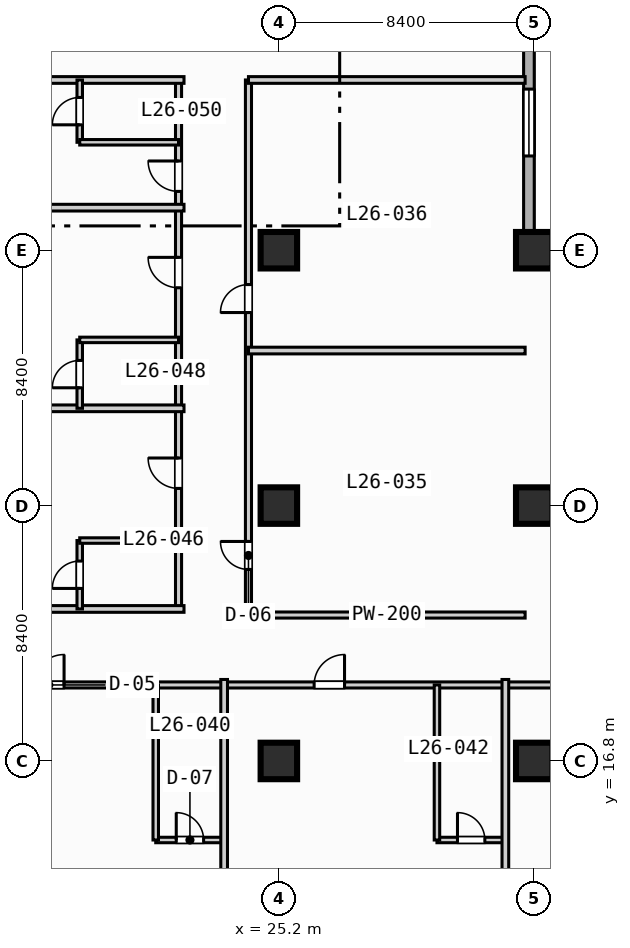
"""IFC4 building model, lengths in metres.
Left out: names, types, materials, properties, quantities, classifications, styles, units other than length and angle.
Written with IfcOpenShell. Run it as: python <this file> out.ifc"""

import sys

from ifc_helpers import new_model, si_unit, direction, frame, frame_2d, origin, origin_2d, place, context, subcontext, project, spatial, rectangle, extrude, element, fill, save


model = new_model("IFC4")
c1 = context("Model", 3, precision=1e-05, world=origin(), true_north=direction((0.0, 1.0)))
c2 = subcontext(c1, "Body", "Model", "MODEL_VIEW")
j1 = project(units=[si_unit("LENGTHUNIT", "METRE"), si_unit("PLANEANGLEUNIT", "RADIAN")], contexts=[c1])
p1 = place(None, origin())
s1 = spatial("IfcSite", under=j1, at=p1, CompositionType="ELEMENT")
p2 = place(p1, origin())
s2 = spatial("IfcBuilding", under=s1, at=p2, CompositionType="ELEMENT")
p3 = place(p2, frame((0.0, 0.0, 111.4)))
s3 = spatial("IfcBuildingStorey", under=s2, at=p3, CompositionType="ELEMENT", Elevation=111.4)
for number, where, z_axis, x_axis in (
    (1, (25.2, 16.8, 0.0), (0.0, 0.0, 1.0), (1.0, 0.0, 0.0)),
    (2, (25.2, 25.2, 0.0), (0.0, 0.0, 1.0), (1.0, 0.0, 0.0)),
    (3, (25.2, 33.6, 0.0), (0.0, 0.0, 1.0), (1.0, 0.0, 0.0)),
    (4, (33.6, 16.8, 0.0), (0.0, 0.0, 1.0), (1.0, 0.0, 0.0)),
    (5, (33.6, 25.2, 0.0), (0.0, 0.0, 1.0), (1.0, 0.0, 0.0)),
    (6, (33.6, 33.6, 0.0), (0.0, 0.0, 1.0), (1.0, 0.0, 0.0)),
):
    element("IfcColumn", number, at=place(p3, frame(where, z_axis=z_axis, x_axis=x_axis)), inside=s3, PredefinedType="COLUMN", context=c2, shape_type="SweptSolid", body=[
        extrude(rectangle(XDim=1.2, YDim=1.2, at=origin_2d()), origin(), (0.0, 0.0, 1.0), 3.8),
    ])
p4 = place(p3, frame((33.425, 89.225, 0.0), z_axis=(0.0, 0.0, 1.0), x_axis=(0.0, -1.0, 0.0)))
e7 = element("IfcWall", 7, at=p4, inside=s3, PredefinedType="STANDARD", context=c2, shape_type="SweptSolid", body=[
    extrude(rectangle(XDim=55.8, YDim=0.35, at=frame_2d((27.9, 0.0))), origin(), (0.0, 0.0, 1.0), 3.55),
])
p5 = place(p4, frame((50.325, 0.0, 0.85)))
e8 = element("IfcOpeningElement", 8, at=p5, cuts=e7, PredefinedType="OPENING", context=c2, shape_type="SweptSolid", body=[
    extrude(rectangle(XDim=2.2, YDim=1.8, at=frame_2d((1.1, 0.9))), frame((0.0, 0.185, 0.0), z_axis=(0.0, -1.0, 0.0), x_axis=(1.0, 0.0, 0.0)), (0.0, 0.0, 1.0), 0.37),
])
p6 = place(p4, frame((33.525, 0.0, 0.85)))
e9 = element("IfcOpeningElement", 9, at=p6, cuts=e7, PredefinedType="OPENING", context=c2, shape_type="SweptSolid", body=[
    extrude(rectangle(XDim=2.2, YDim=1.8, at=frame_2d((1.1, 0.9))), frame((0.0, 0.185, 0.0), z_axis=(0.0, -1.0, 0.0), x_axis=(1.0, 0.0, 0.0)), (0.0, 0.0, 1.0), 0.37),
])
p7 = place(p4, frame((25.125, 0.0, 0.85)))
e10 = element("IfcOpeningElement", 10, at=p7, cuts=e7, PredefinedType="OPENING", context=c2, shape_type="SweptSolid", body=[
    extrude(rectangle(XDim=2.2, YDim=1.8, at=frame_2d((1.1, 0.9))), frame((0.0, 0.185, 0.0), z_axis=(0.0, -1.0, 0.0), x_axis=(1.0, 0.0, 0.0)), (0.0, 0.0, 1.0), 0.37),
])
p8 = place(p4, frame((16.725, 0.0, 0.85)))
e11 = element("IfcOpeningElement", 11, at=p8, cuts=e7, PredefinedType="OPENING", context=c2, shape_type="SweptSolid", body=[
    extrude(rectangle(XDim=2.2, YDim=1.8, at=frame_2d((1.1, 0.9))), frame((0.0, 0.185, 0.0), z_axis=(0.0, -1.0, 0.0), x_axis=(1.0, 0.0, 0.0)), (0.0, 0.0, 1.0), 0.37),
])
p9 = place(p4, frame((8.325, 0.0, 0.85)))
e12 = element("IfcOpeningElement", 12, at=p9, cuts=e7, PredefinedType="OPENING", context=c2, shape_type="SweptSolid", body=[
    extrude(rectangle(XDim=2.2, YDim=1.8, at=frame_2d((1.1, 0.9))), frame((0.0, 0.185, 0.0), z_axis=(0.0, -1.0, 0.0), x_axis=(1.0, 0.0, 0.0)), (0.0, 0.0, 1.0), 0.37),
])
p10 = place(p3, frame((33.425, 33.425, 0.0), z_axis=(0.0, 0.0, 1.0), x_axis=(1.0, 0.0, 0.0)))
e13 = element("IfcWall", 13, at=p10, inside=s3, PredefinedType="STANDARD", context=c2, shape_type="SweptSolid", body=[
    extrude(rectangle(XDim=39.0, YDim=0.35, at=frame_2d((19.5, 0.0))), origin(), (0.0, 0.0, 1.0), 3.55),
])
p11 = place(p10, frame((12.075, 0.0, 0.0)))
e14 = element("IfcOpeningElement", 14, at=p11, cuts=e13, PredefinedType="OPENING", context=c2, shape_type="SweptSolid", body=[
    extrude(rectangle(XDim=1.4, YDim=2.2, at=frame_2d((0.7, 1.1))), frame((0.0, 0.185, 0.0), z_axis=(0.0, -1.0, 0.0), x_axis=(1.0, 0.0, 0.0)), (0.0, 0.0, 1.0), 0.37),
])
p12 = place(p10, frame((20.075, 0.0, 0.85)))
e15 = element("IfcOpeningElement", 15, at=p12, cuts=e13, PredefinedType="OPENING", context=c2, shape_type="SweptSolid", body=[
    extrude(rectangle(XDim=2.2, YDim=1.8, at=frame_2d((1.1, 0.9))), frame((0.0, 0.185, 0.0), z_axis=(0.0, -1.0, 0.0), x_axis=(1.0, 0.0, 0.0)), (0.0, 0.0, 1.0), 0.37),
])
p13 = place(p10, frame((28.475, 0.0, 0.85)))
e16 = element("IfcOpeningElement", 16, at=p13, cuts=e13, PredefinedType="OPENING", context=c2, shape_type="SweptSolid", body=[
    extrude(rectangle(XDim=2.2, YDim=1.8, at=frame_2d((1.1, 0.9))), frame((0.0, 0.185, 0.0), z_axis=(0.0, -1.0, 0.0), x_axis=(1.0, 0.0, 0.0)), (0.0, 0.0, 1.0), 0.37),
])
p14 = place(p3, frame((24.2, 21.6, 0.0), z_axis=(0.0, 0.0, 1.0), x_axis=(0.0, 1.0, 0.0)))
e17 = element("IfcWall", 17, at=p14, inside=s3, PredefinedType="PARTITIONING", context=c2, shape_type="SweptSolid", body=[
    extrude(rectangle(XDim=17.6, YDim=0.2, at=frame_2d((8.8, 0.0))), origin(), (0.0, 0.0, 1.0), 3.55),
])
p15 = place(p14, frame((1.5, 0.0, 0.0)))
e18 = element("IfcOpeningElement", 18, at=p15, cuts=e17, PredefinedType="OPENING", context=c2, shape_type="SweptSolid", body=[
    extrude(rectangle(XDim=0.92, YDim=2.1, at=frame_2d((0.46, 1.05))), frame((0.0, 0.11, 0.0), z_axis=(0.0, -1.0, 0.0), x_axis=(1.0, 0.0, 0.0)), (0.0, 0.0, 1.0), 0.22),
])
p16 = place(p14, frame((9.95, 0.0, 0.0)))
e19 = element("IfcOpeningElement", 19, at=p16, cuts=e17, PredefinedType="OPENING", context=c2, shape_type="SweptSolid", body=[
    extrude(rectangle(XDim=0.92, YDim=2.1, at=frame_2d((0.46, 1.05))), frame((0.0, 0.11, 0.0), z_axis=(0.0, -1.0, 0.0), x_axis=(1.0, 0.0, 0.0)), (0.0, 0.0, 1.0), 0.22),
])
p17 = place(p3, frame((24.2, 21.6, 0.0), z_axis=(0.0, 0.0, 1.0), x_axis=(1.0, 0.0, 0.0)))
e20 = element("IfcWall", 20, at=p17, inside=s3, PredefinedType="PARTITIONING", context=c2, shape_type="SweptSolid", body=[
    extrude(rectangle(XDim=9.1, YDim=0.2, at=frame_2d((4.55, 0.0))), origin(), (0.0, 0.0, 1.0), 3.55),
])
for number, where, z_axis, x_axis in (
    (21, (24.2, 30.3, 0.0), (0.0, 0.0, 1.0), (1.0, 0.0, 0.0)),
    (22, (24.2, 39.2, 0.0), (0.0, 0.0, 1.0), (1.0, 0.0, 0.0)),
):
    element("IfcWall", number, at=place(p3, frame(where, z_axis=z_axis, x_axis=x_axis)), inside=s3, PredefinedType="PARTITIONING", context=c2, shape_type="SweptSolid", body=[
        extrude(rectangle(XDim=9.1, YDim=0.22, at=frame_2d((4.55, 0.0))), origin(), (0.0, 0.0, 1.0), 3.55),
    ])
p18 = place(p3, frame((3.4, 19.3, 0.0), z_axis=(0.0, 0.0, 1.0), x_axis=(1.0, 0.0, 0.0)))
e23 = element("IfcWall", 23, at=p18, inside=s3, PredefinedType="PARTITIONING", context=c2, shape_type="SweptSolid", body=[
    extrude(rectangle(XDim=35.8, YDim=0.2, at=frame_2d((17.9, 0.0))), origin(), (0.0, 0.0, 1.0), 3.55),
])
p19 = place(p18, frame((6.065, 0.0, 0.0)))
e24 = element("IfcOpeningElement", 24, at=p19, cuts=e23, PredefinedType="OPENING", context=c2, shape_type="SweptSolid", body=[
    extrude(rectangle(XDim=1.0, YDim=2.15, at=frame_2d((0.5, 1.075))), frame((0.0, 0.11, 0.0), z_axis=(0.0, -1.0, 0.0), x_axis=(1.0, 0.0, 0.0)), (0.0, 0.0, 1.0), 0.22),
])
p20 = place(p18, frame((13.735, 0.0, 0.0)))
e25 = element("IfcOpeningElement", 25, at=p20, cuts=e23, PredefinedType="OPENING", context=c2, shape_type="SweptSolid", body=[
    extrude(rectangle(XDim=1.0, YDim=2.15, at=frame_2d((0.5, 1.075))), frame((0.0, 0.11, 0.0), z_axis=(0.0, -1.0, 0.0), x_axis=(1.0, 0.0, 0.0)), (0.0, 0.0, 1.0), 0.22),
])
p21 = place(p18, frame((22.96, 0.0, 0.0)))
e26 = element("IfcOpeningElement", 26, at=p21, cuts=e23, PredefinedType="OPENING", context=c2, shape_type="SweptSolid", body=[
    extrude(rectangle(XDim=1.0, YDim=2.15, at=frame_2d((0.5, 1.075))), frame((0.0, 0.11, 0.0), z_axis=(0.0, -1.0, 0.0), x_axis=(1.0, 0.0, 0.0)), (0.0, 0.0, 1.0), 0.22),
])
p22 = place(p18, frame((30.86, 0.0, 0.0)))
e27 = element("IfcOpeningElement", 27, at=p22, cuts=e23, PredefinedType="OPENING", context=c2, shape_type="SweptSolid", body=[
    extrude(rectangle(XDim=1.0, YDim=2.15, at=frame_2d((0.5, 1.075))), frame((0.0, 0.11, 0.0), z_axis=(0.0, -1.0, 0.0), x_axis=(1.0, 0.0, 0.0)), (0.0, 0.0, 1.0), 0.22),
])
p23 = place(p3, frame((21.15, 14.2, 0.0), z_axis=(0.0, 0.0, 1.0), x_axis=(1.0, 0.0, 0.0)))
e28 = element("IfcWall", 28, at=p23, inside=s3, PredefinedType="PLUMBINGWALL", context=c2, shape_type="SweptSolid", body=[
    extrude(rectangle(XDim=2.25, YDim=0.18, at=frame_2d((1.125, 0.0))), origin(), (0.0, 0.0, 1.0), 3.55),
])
p24 = place(p23, frame((0.675, 0.0, 0.0)))
e29 = element("IfcOpeningElement", 29, at=p24, cuts=e28, PredefinedType="OPENING", context=c2, shape_type="SweptSolid", body=[
    extrude(rectangle(XDim=0.9, YDim=2.1, at=frame_2d((0.45, 1.05))), frame((0.0, 0.1, 0.0), z_axis=(0.0, -1.0, 0.0), x_axis=(1.0, 0.0, 0.0)), (0.0, 0.0, 1.0), 0.2),
])
p25 = place(p3, frame((21.15, 14.2, 0.0), z_axis=(0.0, 0.0, 1.0), x_axis=(0.0, 1.0, 0.0)))
e30 = element("IfcWall", 30, at=p25, inside=s3, PredefinedType="PLUMBINGWALL", context=c2, shape_type="SweptSolid", body=[
    extrude(rectangle(XDim=5.1, YDim=0.18, at=frame_2d((2.55, 0.0))), origin(), (0.0, 0.0, 1.0), 3.55),
])
p26 = place(p3, frame((23.4, 0.2, 0.0), z_axis=(0.0, 0.0, 1.0), x_axis=(0.0, 1.0, 0.0)))
e31 = element("IfcWall", 31, at=p26, inside=s3, PredefinedType="PARTITIONING", context=c2, shape_type="SweptSolid", body=[
    extrude(rectangle(XDim=19.28, YDim=0.22, at=frame_2d((9.64, 0.0))), origin(), (0.0, 0.0, 1.0), 3.55),
])
p27 = place(p3, frame((30.4, 14.2, 0.0), z_axis=(0.0, 0.0, 1.0), x_axis=(1.0, 0.0, 0.0)))
e32 = element("IfcWall", 32, at=p27, inside=s3, PredefinedType="PLUMBINGWALL", context=c2, shape_type="SweptSolid", body=[
    extrude(rectangle(XDim=2.25, YDim=0.18, at=frame_2d((1.125, 0.0))), origin(), (0.0, 0.0, 1.0), 3.55),
])
p28 = place(p27, frame((0.675, 0.0, 0.0)))
e33 = element("IfcOpeningElement", 33, at=p28, cuts=e32, PredefinedType="OPENING", context=c2, shape_type="SweptSolid", body=[
    extrude(rectangle(XDim=0.9, YDim=2.1, at=frame_2d((0.45, 1.05))), frame((0.0, 0.1, 0.0), z_axis=(0.0, -1.0, 0.0), x_axis=(1.0, 0.0, 0.0)), (0.0, 0.0, 1.0), 0.2),
])
p29 = place(p3, frame((30.4, 14.2, 0.0), z_axis=(0.0, 0.0, 1.0), x_axis=(0.0, 1.0, 0.0)))
e34 = element("IfcWall", 34, at=p29, inside=s3, PredefinedType="PLUMBINGWALL", context=c2, shape_type="SweptSolid", body=[
    extrude(rectangle(XDim=5.1, YDim=0.18, at=frame_2d((2.55, 0.0))), origin(), (0.0, 0.0, 1.0), 3.55),
])
p30 = place(p3, frame((32.65, 0.2, 0.0), z_axis=(0.0, 0.0, 1.0), x_axis=(0.0, 1.0, 0.0)))
e35 = element("IfcWall", 35, at=p30, inside=s3, PredefinedType="PARTITIONING", context=c2, shape_type="SweptSolid", body=[
    extrude(rectangle(XDim=19.28, YDim=0.22, at=frame_2d((9.64, 0.0))), origin(), (0.0, 0.0, 1.0), 3.55),
])
p31 = place(p3, frame((21.9, 21.8, 0.0), z_axis=(0.0, 0.0, 1.0), x_axis=(0.0, 1.0, 0.0)))
e36 = element("IfcWall", 36, at=p31, inside=s3, PredefinedType="PARTITIONING", context=c2, shape_type="SweptSolid", body=[
    extrude(rectangle(XDim=17.4, YDim=0.2, at=frame_2d((8.7, 0.0))), origin(), (0.0, 0.0, 1.0), 3.55),
])
p32 = place(p31, frame((3.965, 0.0, 0.0)))
e37 = element("IfcOpeningElement", 37, at=p32, cuts=e36, PredefinedType="OPENING", context=c2, shape_type="SweptSolid", body=[
    extrude(rectangle(XDim=1.0, YDim=2.15, at=frame_2d((0.5, 1.075))), frame((0.0, 0.11, 0.0), z_axis=(0.0, -1.0, 0.0), x_axis=(1.0, 0.0, 0.0)), (0.0, 0.0, 1.0), 0.22),
])
p33 = place(p31, frame((10.565, 0.0, 0.0)))
e38 = element("IfcOpeningElement", 38, at=p33, cuts=e36, PredefinedType="OPENING", context=c2, shape_type="SweptSolid", body=[
    extrude(rectangle(XDim=1.0, YDim=2.15, at=frame_2d((0.5, 1.075))), frame((0.0, 0.11, 0.0), z_axis=(0.0, -1.0, 0.0), x_axis=(1.0, 0.0, 0.0)), (0.0, 0.0, 1.0), 0.22),
])
p34 = place(p31, frame((13.735, 0.0, 0.0)))
e39 = element("IfcOpeningElement", 39, at=p34, cuts=e36, PredefinedType="OPENING", context=c2, shape_type="SweptSolid", body=[
    extrude(rectangle(XDim=1.0, YDim=2.15, at=frame_2d((0.5, 1.075))), frame((0.0, 0.11, 0.0), z_axis=(0.0, -1.0, 0.0), x_axis=(1.0, 0.0, 0.0)), (0.0, 0.0, 1.0), 0.22),
])
p35 = place(p3, frame((0.2, 21.8, 0.0), z_axis=(0.0, 0.0, 1.0), x_axis=(1.0, 0.0, 0.0)))
e40 = element("IfcWall", 40, at=p35, inside=s3, PredefinedType="PARTITIONING", context=c2, shape_type="SweptSolid", body=[
    extrude(rectangle(XDim=21.88, YDim=0.22, at=frame_2d((10.94, 0.0))), origin(), (0.0, 0.0, 1.0), 3.55),
])
p36 = place(p3, frame((18.65, 21.8, 0.0), z_axis=(0.0, 0.0, 1.0), x_axis=(0.0, 1.0, 0.0)))
e41 = element("IfcWall", 41, at=p36, inside=s3, PredefinedType="PLUMBINGWALL", context=c2, shape_type="SweptSolid", body=[
    extrude(rectangle(XDim=2.25, YDim=0.18, at=frame_2d((1.125, 0.0))), origin(), (0.0, 0.0, 1.0), 3.55),
])
p37 = place(p36, frame((0.675, 0.0, 0.0)))
e42 = element("IfcOpeningElement", 42, at=p37, cuts=e41, PredefinedType="OPENING", context=c2, shape_type="SweptSolid", body=[
    extrude(rectangle(XDim=0.9, YDim=2.1, at=frame_2d((0.45, 1.05))), frame((0.0, 0.1, 0.0), z_axis=(0.0, -1.0, 0.0), x_axis=(1.0, 0.0, 0.0)), (0.0, 0.0, 1.0), 0.2),
])
p38 = place(p3, frame((18.65, 24.05, 0.0), z_axis=(0.0, 0.0, 1.0), x_axis=(1.0, 0.0, 0.0)))
e43 = element("IfcWall", 43, at=p38, inside=s3, PredefinedType="PLUMBINGWALL", context=c2, shape_type="SweptSolid", body=[
    extrude(rectangle(XDim=3.25, YDim=0.18, at=frame_2d((1.625, 0.0))), origin(), (0.0, 0.0, 1.0), 3.55),
])
p39 = place(p3, frame((0.2, 28.4, 0.0), z_axis=(0.0, 0.0, 1.0), x_axis=(1.0, 0.0, 0.0)))
e44 = element("IfcWall", 44, at=p39, inside=s3, PredefinedType="PARTITIONING", context=c2, shape_type="SweptSolid", body=[
    extrude(rectangle(XDim=21.88, YDim=0.22, at=frame_2d((10.94, 0.0))), origin(), (0.0, 0.0, 1.0), 3.55),
])
p40 = place(p3, frame((18.65, 28.4, 0.0), z_axis=(0.0, 0.0, 1.0), x_axis=(0.0, 1.0, 0.0)))
e45 = element("IfcWall", 45, at=p40, inside=s3, PredefinedType="PLUMBINGWALL", context=c2, shape_type="SweptSolid", body=[
    extrude(rectangle(XDim=2.25, YDim=0.18, at=frame_2d((1.125, 0.0))), origin(), (0.0, 0.0, 1.0), 3.55),
])
p41 = place(p40, frame((0.675, 0.0, 0.0)))
e46 = element("IfcOpeningElement", 46, at=p41, cuts=e45, PredefinedType="OPENING", context=c2, shape_type="SweptSolid", body=[
    extrude(rectangle(XDim=0.9, YDim=2.1, at=frame_2d((0.45, 1.05))), frame((0.0, 0.1, 0.0), z_axis=(0.0, -1.0, 0.0), x_axis=(1.0, 0.0, 0.0)), (0.0, 0.0, 1.0), 0.2),
])
p42 = place(p3, frame((18.65, 30.65, 0.0), z_axis=(0.0, 0.0, 1.0), x_axis=(1.0, 0.0, 0.0)))
e47 = element("IfcWall", 47, at=p42, inside=s3, PredefinedType="PLUMBINGWALL", context=c2, shape_type="SweptSolid", body=[
    extrude(rectangle(XDim=3.25, YDim=0.18, at=frame_2d((1.625, 0.0))), origin(), (0.0, 0.0, 1.0), 3.55),
])
for number, where, z_axis, x_axis in (
    (48, (0.2, 35.0, 0.0), (0.0, 0.0, 1.0), (1.0, 0.0, 0.0)),
    (49, (0.2, 39.2, 0.0), (0.0, 0.0, 1.0), (1.0, 0.0, 0.0)),
):
    element("IfcWall", number, at=place(p3, frame(where, z_axis=z_axis, x_axis=x_axis)), inside=s3, PredefinedType="PARTITIONING", context=c2, shape_type="SweptSolid", body=[
        extrude(rectangle(XDim=21.88, YDim=0.22, at=frame_2d((10.94, 0.0))), origin(), (0.0, 0.0, 1.0), 3.55),
    ])
p43 = place(p3, frame((18.65, 37.15, 0.0), z_axis=(0.0, 0.0, 1.0), x_axis=(0.0, 1.0, 0.0)))
e50 = element("IfcWall", 50, at=p43, inside=s3, PredefinedType="PLUMBINGWALL", context=c2, shape_type="SweptSolid", body=[
    extrude(rectangle(XDim=2.05, YDim=0.18, at=frame_2d((1.025, 0.0))), origin(), (0.0, 0.0, 1.0), 3.55),
])
p44 = place(p43, frame((0.575, 0.0, 0.0)))
e51 = element("IfcOpeningElement", 51, at=p44, cuts=e50, PredefinedType="OPENING", context=c2, shape_type="SweptSolid", body=[
    extrude(rectangle(XDim=0.9, YDim=2.1, at=frame_2d((0.45, 1.05))), frame((0.0, 0.1, 0.0), z_axis=(0.0, -1.0, 0.0), x_axis=(1.0, 0.0, 0.0)), (0.0, 0.0, 1.0), 0.2),
])
p45 = place(p3, frame((18.65, 37.15, 0.0), z_axis=(0.0, 0.0, 1.0), x_axis=(1.0, 0.0, 0.0)))
e52 = element("IfcWall", 52, at=p45, inside=s3, PredefinedType="PLUMBINGWALL", context=c2, shape_type="SweptSolid", body=[
    extrude(rectangle(XDim=3.25, YDim=0.18, at=frame_2d((1.625, 0.0))), origin(), (0.0, 0.0, 1.0), 3.55),
])
p46 = place(p5, origin())
e53 = element("IfcWindow", 53, at=p46, inside=s3, PartitioningType="SINGLE_PANEL", PredefinedType="WINDOW", context=c2, shape_type="SweptSolid", body=[
    extrude(rectangle(XDim=2.2, YDim=1.8, at=frame_2d((1.1, 0.9))), frame((0.0, 0.03, 0.0), z_axis=(0.0, -1.0, 0.0), x_axis=(1.0, 0.0, 0.0)), (0.0, 0.0, 1.0), 0.06),
])
fill(e8, e53)
p47 = place(p15, origin())
e54 = element("IfcDoor", 54, at=p47, inside=s3, OperationType="SINGLE_SWING_RIGHT", PredefinedType="DOOR", context=c2, shape_type="SweptSolid", body=[
    extrude(rectangle(XDim=0.92, YDim=2.1, at=frame_2d((0.46, 1.05))), frame((0.0, 0.025, 0.0), z_axis=(0.0, -1.0, 0.0), x_axis=(1.0, 0.0, 0.0)), (0.0, 0.0, 1.0), 0.05),
])
fill(e18, e54)
p48 = place(p16, origin())
e55 = element("IfcDoor", 55, at=p48, inside=s3, OperationType="SINGLE_SWING_LEFT", PredefinedType="DOOR", context=c2, shape_type="SweptSolid", body=[
    extrude(rectangle(XDim=0.92, YDim=2.1, at=frame_2d((0.46, 1.05))), frame((0.0, 0.025, 0.0), z_axis=(0.0, -1.0, 0.0), x_axis=(1.0, 0.0, 0.0)), (0.0, 0.0, 1.0), 0.05),
])
fill(e19, e55)
p49 = place(p20, origin())
e56 = element("IfcDoor", 56, at=p49, inside=s3, OperationType="SINGLE_SWING_RIGHT", PredefinedType="DOOR", context=c2, shape_type="SweptSolid", body=[
    extrude(rectangle(XDim=1.0, YDim=2.15, at=frame_2d((0.5, 1.075))), frame((0.0, 0.025, 0.0), z_axis=(0.0, -1.0, 0.0), x_axis=(1.0, 0.0, 0.0)), (0.0, 0.0, 1.0), 0.05),
])
fill(e25, e56)
p50 = place(p21, origin())
e57 = element("IfcDoor", 57, at=p50, inside=s3, OperationType="SINGLE_SWING_RIGHT", PredefinedType="DOOR", context=c2, shape_type="SweptSolid", body=[
    extrude(rectangle(XDim=1.0, YDim=2.15, at=frame_2d((0.5, 1.075))), frame((0.0, 0.025, 0.0), z_axis=(0.0, -1.0, 0.0), x_axis=(1.0, 0.0, 0.0)), (0.0, 0.0, 1.0), 0.05),
])
fill(e26, e57)
p51 = place(p24, origin())
e58 = element("IfcDoor", 58, at=p51, inside=s3, OperationType="SINGLE_SWING_LEFT", PredefinedType="DOOR", context=c2, shape_type="SweptSolid", body=[
    extrude(rectangle(XDim=0.9, YDim=2.1, at=frame_2d((0.45, 1.05))), frame((0.0, 0.025, 0.0), z_axis=(0.0, -1.0, 0.0), x_axis=(1.0, 0.0, 0.0)), (0.0, 0.0, 1.0), 0.05),
])
fill(e29, e58)
p52 = place(p28, origin())
e59 = element("IfcDoor", 59, at=p52, inside=s3, OperationType="SINGLE_SWING_LEFT", PredefinedType="DOOR", context=c2, shape_type="SweptSolid", body=[
    extrude(rectangle(XDim=0.9, YDim=2.1, at=frame_2d((0.45, 1.05))), frame((0.0, 0.025, 0.0), z_axis=(0.0, -1.0, 0.0), x_axis=(1.0, 0.0, 0.0)), (0.0, 0.0, 1.0), 0.05),
])
fill(e33, e59)
p53 = place(p32, origin())
e60 = element("IfcDoor", 60, at=p53, inside=s3, OperationType="SINGLE_SWING_RIGHT", PredefinedType="DOOR", context=c2, shape_type="SweptSolid", body=[
    extrude(rectangle(XDim=1.0, YDim=2.15, at=frame_2d((0.5, 1.075))), frame((0.0, 0.025, 0.0), z_axis=(0.0, -1.0, 0.0), x_axis=(1.0, 0.0, 0.0)), (0.0, 0.0, 1.0), 0.05),
])
fill(e37, e60)
p54 = place(p33, origin())
e61 = element("IfcDoor", 61, at=p54, inside=s3, OperationType="SINGLE_SWING_RIGHT", PredefinedType="DOOR", context=c2, shape_type="SweptSolid", body=[
    extrude(rectangle(XDim=1.0, YDim=2.15, at=frame_2d((0.5, 1.075))), frame((0.0, 0.025, 0.0), z_axis=(0.0, -1.0, 0.0), x_axis=(1.0, 0.0, 0.0)), (0.0, 0.0, 1.0), 0.05),
])
fill(e38, e61)
p55 = place(p34, origin())
e62 = element("IfcDoor", 62, at=p55, inside=s3, OperationType="SINGLE_SWING_RIGHT", PredefinedType="DOOR", context=c2, shape_type="SweptSolid", body=[
    extrude(rectangle(XDim=1.0, YDim=2.15, at=frame_2d((0.5, 1.075))), frame((0.0, 0.025, 0.0), z_axis=(0.0, -1.0, 0.0), x_axis=(1.0, 0.0, 0.0)), (0.0, 0.0, 1.0), 0.05),
])
fill(e39, e62)
p56 = place(p37, origin())
e63 = element("IfcDoor", 63, at=p56, inside=s3, OperationType="SINGLE_SWING_LEFT", PredefinedType="DOOR", context=c2, shape_type="SweptSolid", body=[
    extrude(rectangle(XDim=0.9, YDim=2.1, at=frame_2d((0.45, 1.05))), frame((0.0, 0.025, 0.0), z_axis=(0.0, -1.0, 0.0), x_axis=(1.0, 0.0, 0.0)), (0.0, 0.0, 1.0), 0.05),
])
fill(e42, e63)
p57 = place(p41, origin())
e64 = element("IfcDoor", 64, at=p57, inside=s3, OperationType="SINGLE_SWING_LEFT", PredefinedType="DOOR", context=c2, shape_type="SweptSolid", body=[
    extrude(rectangle(XDim=0.9, YDim=2.1, at=frame_2d((0.45, 1.05))), frame((0.0, 0.025, 0.0), z_axis=(0.0, -1.0, 0.0), x_axis=(1.0, 0.0, 0.0)), (0.0, 0.0, 1.0), 0.05),
])
fill(e46, e64)
p58 = place(p44, origin())
e65 = element("IfcDoor", 65, at=p58, inside=s3, OperationType="SINGLE_SWING_LEFT", PredefinedType="DOOR", context=c2, shape_type="SweptSolid", body=[
    extrude(rectangle(XDim=0.9, YDim=2.1, at=frame_2d((0.45, 1.05))), frame((0.0, 0.025, 0.0), z_axis=(0.0, -1.0, 0.0), x_axis=(1.0, 0.0, 0.0)), (0.0, 0.0, 1.0), 0.05),
])
fill(e51, e65)
save(model, sys.argv[1])
